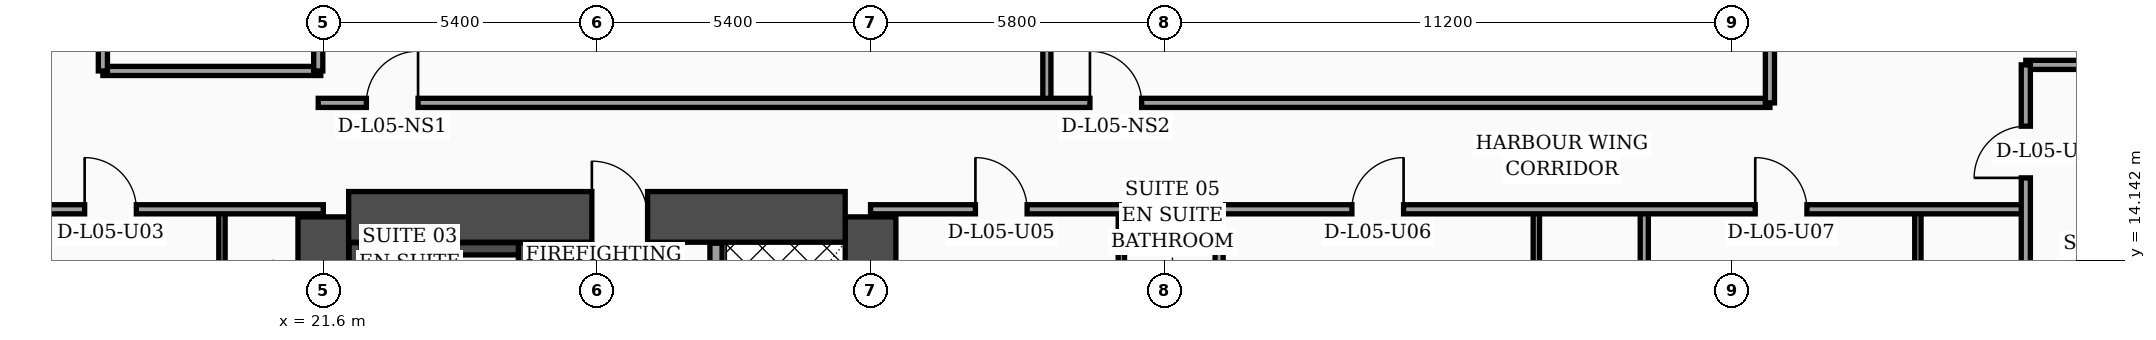
"""IFC4 building model, lengths in metres.
Left out: names, types, materials, properties, quantities, classifications, styles, units other than length and angle.
Written with IfcOpenShell. Run it as: python <this file> out.ifc"""

import sys

from ifc_helpers import new_model, si_unit, direction, frame, frame_2d, origin, place, context, subcontext, project, spatial, rectangle, extrude, element, fill, save


model = new_model("IFC4")
c1 = context("Model", 3, precision=1e-05, world=origin(), true_north=direction((0.0, 1.0)))
c2 = subcontext(c1, "Body", "Model", "MODEL_VIEW")
j1 = project(units=[si_unit("LENGTHUNIT", "METRE"), si_unit("PLANEANGLEUNIT", "RADIAN")], contexts=[c1])
p1 = place(None, origin())
s1 = spatial("IfcSite", under=j1, at=p1, CompositionType="ELEMENT")
p2 = place(p1, origin())
s2 = spatial("IfcBuilding", under=s1, at=p2, CompositionType="ELEMENT")
p3 = place(p2, frame((0.0, 0.0, 27.0)))
s3 = spatial("IfcBuildingStorey", under=s2, at=p3, CompositionType="ELEMENT", Elevation=27.0)
for number, where, z_axis, x_axis in (
    (1, (21.6, 4.6, 0.0), (0.0, 0.0, 1.0), (0.0, 1.0, 0.0)),
    (2, (32.4, 4.6, 0.0), (0.0, 0.0, 1.0), (0.0, 1.0, 0.0)),
):
    element("IfcWall", number, at=place(p3, frame(where, z_axis=z_axis, x_axis=x_axis)), inside=s3, PredefinedType="SHEAR", context=c2, shape_type="SweptSolid", body=[
        extrude(rectangle(XDim=10.4, YDim=1.0, at=frame_2d((5.2, 0.0))), origin(), (0.0, 0.0, 1.0), 3.56),
    ])
p4 = place(p3, frame((22.1, 15.0, 0.0), z_axis=(0.0, 0.0, 1.0), x_axis=(1.0, 0.0, 0.0)))
e3 = element("IfcWall", 3, at=p4, inside=s3, PredefinedType="SHEAR", context=c2, shape_type="SweptSolid", body=[
    extrude(rectangle(XDim=9.8, YDim=1.0, at=frame_2d((4.9, 0.0))), origin(), (0.0, 0.0, 1.0), 3.56),
])
p5 = place(p4, frame((4.8, 0.0, 0.0)))
e4 = element("IfcOpeningElement", 4, at=p5, cuts=e3, PredefinedType="OPENING", context=c2, shape_type="SweptSolid", body=[
    extrude(rectangle(XDim=1.1, YDim=2.2, at=frame_2d((0.55, 1.1))), frame((0.0, 0.51, 0.0), z_axis=(0.0, -1.0, 0.0), x_axis=(1.0, 0.0, 0.0)), (0.0, 0.0, 1.0), 1.02),
])
p6 = place(p3, frame((22.23, 5.1, 0.0), z_axis=(0.0, 0.0, 1.0), x_axis=(0.0, 1.0, 0.0)))
e5 = element("IfcWall", 5, at=p6, inside=s3, PredefinedType="SOLIDWALL", context=c2, shape_type="SweptSolid", body=[
    extrude(rectangle(XDim=9.39, YDim=0.24, at=frame_2d((4.695, 0.0))), origin(), (0.0, 0.0, 1.0), 3.56),
])
p7 = place(p3, frame((25.57, 5.1, 0.0), z_axis=(0.0, 0.0, 1.0), x_axis=(0.0, 1.0, 0.0)))
e6 = element("IfcWall", 6, at=p7, inside=s3, PredefinedType="SOLIDWALL", context=c2, shape_type="SweptSolid", body=[
    extrude(rectangle(XDim=9.39, YDim=0.24, at=frame_2d((4.695, 0.0))), origin(), (0.0, 0.0, 1.0), 3.56),
])
p8 = place(p7, frame((0.35, 0.0, 0.0)))
e7 = element("IfcOpeningElement", 7, at=p8, cuts=e6, PredefinedType="OPENING", context=c2, shape_type="SweptSolid", body=[
    extrude(rectangle(XDim=1.15, YDim=2.2, at=frame_2d((0.575, 1.1))), frame((0.0, 0.13, 0.0), z_axis=(0.0, -1.0, 0.0), x_axis=(1.0, 0.0, 0.0)), (0.0, 0.0, 1.0), 0.26),
])
p9 = place(p3, frame((22.35, 14.37, 0.0), z_axis=(0.0, 0.0, 1.0), x_axis=(1.0, 0.0, 0.0)))
e8 = element("IfcWall", 8, at=p9, inside=s3, PredefinedType="SOLIDWALL", context=c2, shape_type="SweptSolid", body=[
    extrude(rectangle(XDim=3.1, YDim=0.24, at=frame_2d((1.55, 0.0))), origin(), (0.0, 0.0, 1.0), 3.56),
])
p10 = place(p3, frame((63.63, 5.505, 0.0), z_axis=(0.0, 0.0, 1.0), x_axis=(-0.300501856448, 0.953781229775, 0.0)))
e9 = element("IfcWall", 9, at=p10, inside=s3, PredefinedType="SOLIDWALL", context=c2, shape_type="SweptSolid", body=[
    extrude(rectangle(XDim=30.814, YDim=0.32, at=frame_2d((15.407, 0.0))), origin(), (0.0, 0.0, 1.0), 3.56),
])
p11 = place(p10, frame((4.6, 0.0, 0.0)))
e10 = element("IfcOpeningElement", 10, at=p11, cuts=e9, PredefinedType="OPENING", context=c2, shape_type="SweptSolid", body=[
    extrude(rectangle(XDim=1.4, YDim=2.25, at=frame_2d((0.7, 1.125))), frame((0.0, 0.17, 0.0), z_axis=(0.0, -1.0, 0.0), x_axis=(1.0, 0.0, 0.0)), (0.0, 0.0, 1.0), 0.34),
])
p12 = place(p10, frame((7.8, 0.0, 0.75)))
e11 = element("IfcOpeningElement", 11, at=p12, cuts=e9, PredefinedType="OPENING", context=c2, shape_type="SweptSolid", body=[
    extrude(rectangle(XDim=1.5, YDim=1.6, at=frame_2d((0.75, 0.8))), frame((0.0, 0.17, 0.0), z_axis=(0.0, -1.0, 0.0), x_axis=(1.0, 0.0, 0.0)), (0.0, 0.0, 1.0), 0.34),
])
p13 = place(p10, frame((10.9, 0.0, 0.75)))
e12 = element("IfcOpeningElement", 12, at=p13, cuts=e9, PredefinedType="OPENING", context=c2, shape_type="SweptSolid", body=[
    extrude(rectangle(XDim=1.5, YDim=1.6, at=frame_2d((0.75, 0.8))), frame((0.0, 0.17, 0.0), z_axis=(0.0, -1.0, 0.0), x_axis=(1.0, 0.0, 0.0)), (0.0, 0.0, 1.0), 0.34),
])
p14 = place(p10, frame((14.0, 0.0, 0.75)))
e13 = element("IfcOpeningElement", 13, at=p14, cuts=e9, PredefinedType="OPENING", context=c2, shape_type="SweptSolid", body=[
    extrude(rectangle(XDim=1.5, YDim=1.6, at=frame_2d((0.75, 0.8))), frame((0.0, 0.17, 0.0), z_axis=(0.0, -1.0, 0.0), x_axis=(1.0, 0.0, 0.0)), (0.0, 0.0, 1.0), 0.34),
])
p15 = place(p10, frame((17.1, 0.0, 0.75)))
e14 = element("IfcOpeningElement", 14, at=p15, cuts=e9, PredefinedType="OPENING", context=c2, shape_type="SweptSolid", body=[
    extrude(rectangle(XDim=1.5, YDim=1.6, at=frame_2d((0.75, 0.8))), frame((0.0, 0.17, 0.0), z_axis=(0.0, -1.0, 0.0), x_axis=(1.0, 0.0, 0.0)), (0.0, 0.0, 1.0), 0.34),
])
p16 = place(p10, frame((20.2, 0.0, 0.75)))
e15 = element("IfcOpeningElement", 15, at=p16, cuts=e9, PredefinedType="OPENING", context=c2, shape_type="SweptSolid", body=[
    extrude(rectangle(XDim=1.5, YDim=1.6, at=frame_2d((0.75, 0.8))), frame((0.0, 0.17, 0.0), z_axis=(0.0, -1.0, 0.0), x_axis=(1.0, 0.0, 0.0)), (0.0, 0.0, 1.0), 0.34),
])
p17 = place(p10, frame((23.3, 0.0, 0.75)))
e16 = element("IfcOpeningElement", 16, at=p17, cuts=e9, PredefinedType="OPENING", context=c2, shape_type="SweptSolid", body=[
    extrude(rectangle(XDim=1.5, YDim=1.6, at=frame_2d((0.75, 0.8))), frame((0.0, 0.17, 0.0), z_axis=(0.0, -1.0, 0.0), x_axis=(1.0, 0.0, 0.0)), (0.0, 0.0, 1.0), 0.34),
])
p18 = place(p10, frame((26.4, 0.0, 0.75)))
e17 = element("IfcOpeningElement", 17, at=p18, cuts=e9, PredefinedType="OPENING", context=c2, shape_type="SweptSolid", body=[
    extrude(rectangle(XDim=1.5, YDim=1.6, at=frame_2d((0.75, 0.8))), frame((0.0, 0.17, 0.0), z_axis=(0.0, -1.0, 0.0), x_axis=(1.0, 0.0, 0.0)), (0.0, 0.0, 1.0), 0.34),
])
p19 = place(p3, frame((29.35, 5.12, 0.0), z_axis=(0.0, 0.0, 1.0), x_axis=(0.0, 1.0, 0.0)))
e18 = element("IfcWall", 18, at=p19, inside=s3, PredefinedType="SOLIDWALL", context=c2, shape_type="SweptSolid", body=[
    extrude(rectangle(XDim=9.36, YDim=0.24, at=frame_2d((4.68, 0.0))), origin(), (0.0, 0.0, 1.0), 3.56),
])
p20 = place(p19, frame((0.55, 0.0, 0.0)))
e19 = element("IfcOpeningElement", 19, at=p20, cuts=e18, PredefinedType="OPENING", context=c2, shape_type="SweptSolid", body=[
    extrude(rectangle(XDim=1.3, YDim=2.35, at=frame_2d((0.65, 1.175))), frame((0.0, 0.13, 0.0), z_axis=(0.0, -1.0, 0.0), x_axis=(1.0, 0.0, 0.0)), (0.0, 0.0, 1.0), 0.26),
])
p21 = place(p3, frame((19.6, 2.44, 0.0), z_axis=(0.0, 0.0, 1.0), x_axis=(0.0, 1.0, 0.0)))
e20 = element("IfcWall", 20, at=p21, inside=s3, PredefinedType="PARTITIONING", context=c2, shape_type="SweptSolid", body=[
    extrude(rectangle(XDim=12.71, YDim=0.125, at=frame_2d((6.355, 0.0))), origin(), (0.0, 0.0, 1.0), 2.34),
])
p22 = place(p21, frame((4.34, 0.0, 0.0)))
e21 = element("IfcOpeningElement", 21, at=p22, cuts=e20, PredefinedType="OPENING", context=c2, shape_type="SweptSolid", body=[
    extrude(rectangle(XDim=0.96, YDim=2.2, at=frame_2d((0.48, 1.1))), frame((0.0, 0.073, 0.0), z_axis=(0.0, -1.0, 0.0), x_axis=(1.0, 0.0, 0.0)), (0.0, 0.0, 1.0), 0.145),
])
p23 = place(p21, frame((10.18, 0.0, 0.0)))
e22 = element("IfcOpeningElement", 22, at=p23, cuts=e20, PredefinedType="OPENING", context=c2, shape_type="SweptSolid", body=[
    extrude(rectangle(XDim=0.9, YDim=2.15, at=frame_2d((0.45, 1.075))), frame((0.0, 0.073, 0.0), z_axis=(0.0, -1.0, 0.0), x_axis=(1.0, 0.0, 0.0)), (0.0, 0.0, 1.0), 0.145),
])
p24 = place(p3, frame((15.15, 15.15, 0.0), z_axis=(0.0, 0.0, 1.0), x_axis=(1.0, 0.0, 0.0)))
e23 = element("IfcWall", 23, at=p24, inside=s3, PredefinedType="PARTITIONING", context=c2, shape_type="SweptSolid", body=[
    extrude(rectangle(XDim=6.45, YDim=0.18, at=frame_2d((3.225, 0.0))), origin(), (0.0, 0.0, 1.0), 2.34),
])
p25 = place(p24, frame((1.74, 0.0, 0.0)))
e24 = element("IfcOpeningElement", 24, at=p25, cuts=e23, PredefinedType="OPENING", context=c2, shape_type="SweptSolid", body=[
    extrude(rectangle(XDim=1.02, YDim=2.2, at=frame_2d((0.51, 1.1))), frame((0.0, 0.1, 0.0), z_axis=(0.0, -1.0, 0.0), x_axis=(1.0, 0.0, 0.0)), (0.0, 0.0, 1.0), 0.2),
])
p26 = place(p3, frame((17.25, 17.88, 0.0), z_axis=(0.0, 0.0, 1.0), x_axis=(1.0, 0.0, 0.0)))
e25 = element("IfcWall", 25, at=p26, inside=s3, PredefinedType="PARTITIONING", context=c2, shape_type="SweptSolid", body=[
    extrude(rectangle(XDim=4.3, YDim=0.18, at=frame_2d((2.15, 0.0))), origin(), (0.0, 0.0, 1.0), 3.56),
])
p27 = place(p3, frame((21.5, 17.88, 0.0), z_axis=(0.0, 0.0, 1.0), x_axis=(0.0, 1.0, 0.0)))
e26 = element("IfcWall", 26, at=p27, inside=s3, PredefinedType="PARTITIONING", context=c2, shape_type="SweptSolid", body=[
    extrude(rectangle(XDim=6.44, YDim=0.18, at=frame_2d((3.22, 0.0))), origin(), (0.0, 0.0, 1.0), 3.56),
])
p28 = place(p3, frame((17.25, 17.88, 0.0), z_axis=(0.0, 0.0, 1.0), x_axis=(0.0, 1.0, 0.0)))
e27 = element("IfcWall", 27, at=p28, inside=s3, PredefinedType="PARTITIONING", context=c2, shape_type="SweptSolid", body=[
    extrude(rectangle(XDim=6.44, YDim=0.18, at=frame_2d((3.22, 0.0))), origin(), (0.0, 0.0, 1.0), 3.56),
])
p29 = place(p28, frame((0.65, 0.0, 0.0)))
e28 = element("IfcOpeningElement", 28, at=p29, cuts=e27, PredefinedType="OPENING", context=c2, shape_type="SweptSolid", body=[
    extrude(rectangle(XDim=0.98, YDim=2.15, at=frame_2d((0.49, 1.075))), frame((0.0, 0.1, 0.0), z_axis=(0.0, -1.0, 0.0), x_axis=(1.0, 0.0, 0.0)), (0.0, 0.0, 1.0), 0.2),
])
p30 = place(p28, frame((3.27, 0.0, 0.0)))
e29 = element("IfcOpeningElement", 29, at=p30, cuts=e27, PredefinedType="OPENING", context=c2, shape_type="SweptSolid", body=[
    extrude(rectangle(XDim=0.96, YDim=2.2, at=frame_2d((0.48, 1.1))), frame((0.0, 0.1, 0.0), z_axis=(0.0, -1.0, 0.0), x_axis=(1.0, 0.0, 0.0)), (0.0, 0.0, 1.0), 0.2),
])
p31 = place(p3, frame((37.35, 2.44, 0.0), z_axis=(0.0, 0.0, 1.0), x_axis=(0.0, 1.0, 0.0)))
e30 = element("IfcWall", 30, at=p31, inside=s3, PredefinedType="PARTITIONING", context=c2, shape_type="SweptSolid", body=[
    extrude(rectangle(XDim=12.71, YDim=0.125, at=frame_2d((6.355, 0.0))), origin(), (0.0, 0.0, 1.0), 2.84),
])
p32 = place(p31, frame((4.35, 0.0, 0.0)))
e31 = element("IfcOpeningElement", 31, at=p32, cuts=e30, PredefinedType="OPENING", context=c2, shape_type="SweptSolid", body=[
    extrude(rectangle(XDim=0.96, YDim=2.2, at=frame_2d((0.48, 1.1))), frame((0.0, 0.073, 0.0), z_axis=(0.0, -1.0, 0.0), x_axis=(1.0, 0.0, 0.0)), (0.0, 0.0, 1.0), 0.145),
])
p33 = place(p31, frame((10.21, 0.0, 0.0)))
e32 = element("IfcOpeningElement", 32, at=p33, cuts=e30, PredefinedType="OPENING", context=c2, shape_type="SweptSolid", body=[
    extrude(rectangle(XDim=0.9, YDim=2.15, at=frame_2d((0.45, 1.075))), frame((0.0, 0.073, 0.0), z_axis=(0.0, -1.0, 0.0), x_axis=(1.0, 0.0, 0.0)), (0.0, 0.0, 1.0), 0.145),
])
p34 = place(p3, frame((45.54, 2.44, 0.0), z_axis=(0.0, 0.0, 1.0), x_axis=(0.0, 1.0, 0.0)))
e33 = element("IfcWall", 33, at=p34, inside=s3, PredefinedType="PARTITIONING", context=c2, shape_type="SweptSolid", body=[
    extrude(rectangle(XDim=12.71, YDim=0.125, at=frame_2d((6.355, 0.0))), origin(), (0.0, 0.0, 1.0), 3.04),
])
p35 = place(p34, frame((4.35, 0.0, 0.0)))
e34 = element("IfcOpeningElement", 34, at=p35, cuts=e33, PredefinedType="OPENING", context=c2, shape_type="SweptSolid", body=[
    extrude(rectangle(XDim=0.96, YDim=2.2, at=frame_2d((0.48, 1.1))), frame((0.0, 0.073, 0.0), z_axis=(0.0, -1.0, 0.0), x_axis=(1.0, 0.0, 0.0)), (0.0, 0.0, 1.0), 0.145),
])
p36 = place(p34, frame((10.21, 0.0, 0.0)))
e35 = element("IfcOpeningElement", 35, at=p36, cuts=e33, PredefinedType="OPENING", context=c2, shape_type="SweptSolid", body=[
    extrude(rectangle(XDim=0.9, YDim=2.15, at=frame_2d((0.45, 1.075))), frame((0.0, 0.073, 0.0), z_axis=(0.0, -1.0, 0.0), x_axis=(1.0, 0.0, 0.0)), (0.0, 0.0, 1.0), 0.145),
])
p37 = place(p3, frame((39.28, 2.44, 0.0), z_axis=(0.0, 0.0, 1.0), x_axis=(0.0, 1.0, 0.0)))
e36 = element("IfcWall", 36, at=p37, inside=s3, PredefinedType="PARTITIONING", context=c2, shape_type="SweptSolid", body=[
    extrude(rectangle(XDim=12.71, YDim=0.16, at=frame_2d((6.355, 0.0))), origin(), (0.0, 0.0, 1.0), 2.84),
])
p38 = place(p3, frame((53.07, 2.44, 0.0), z_axis=(0.0, 0.0, 1.0), x_axis=(0.0, 1.0, 0.0)))
e37 = element("IfcWall", 37, at=p38, inside=s3, PredefinedType="PARTITIONING", context=c2, shape_type="SweptSolid", body=[
    extrude(rectangle(XDim=12.71, YDim=0.125, at=frame_2d((6.355, 0.0))), origin(), (0.0, 0.0, 1.0), 3.04),
])
p39 = place(p38, frame((4.35, 0.0, 0.0)))
e38 = element("IfcOpeningElement", 38, at=p39, cuts=e37, PredefinedType="OPENING", context=c2, shape_type="SweptSolid", body=[
    extrude(rectangle(XDim=0.96, YDim=2.2, at=frame_2d((0.48, 1.1))), frame((0.0, 0.073, 0.0), z_axis=(0.0, -1.0, 0.0), x_axis=(1.0, 0.0, 0.0)), (0.0, 0.0, 1.0), 0.145),
])
p40 = place(p38, frame((10.21, 0.0, 0.0)))
e39 = element("IfcOpeningElement", 39, at=p40, cuts=e37, PredefinedType="OPENING", context=c2, shape_type="SweptSolid", body=[
    extrude(rectangle(XDim=0.9, YDim=2.15, at=frame_2d((0.45, 1.075))), frame((0.0, 0.073, 0.0), z_axis=(0.0, -1.0, 0.0), x_axis=(1.0, 0.0, 0.0)), (0.0, 0.0, 1.0), 0.145),
])
p41 = place(p3, frame((47.67, 2.44, 0.0), z_axis=(0.0, 0.0, 1.0), x_axis=(0.0, 1.0, 0.0)))
e40 = element("IfcWall", 40, at=p41, inside=s3, PredefinedType="PARTITIONING", context=c2, shape_type="SweptSolid", body=[
    extrude(rectangle(XDim=12.71, YDim=0.16, at=frame_2d((6.355, 0.0))), origin(), (0.0, 0.0, 1.0), 2.84),
])
p42 = place(p3, frame((32.4, 15.15, 0.0), z_axis=(0.0, 0.0, 1.0), x_axis=(1.0, 0.0, 0.0)))
e41 = element("IfcWall", 41, at=p42, inside=s3, PredefinedType="PARTITIONING", context=c2, shape_type="SweptSolid", body=[
    extrude(rectangle(XDim=22.8, YDim=0.18, at=frame_2d((11.4, 0.0))), origin(), (0.0, 0.0, 1.0), 2.84),
])
p43 = place(p42, frame((2.07, 0.0, 0.0)))
e42 = element("IfcOpeningElement", 42, at=p43, cuts=e41, PredefinedType="OPENING", context=c2, shape_type="SweptSolid", body=[
    extrude(rectangle(XDim=1.02, YDim=2.2, at=frame_2d((0.51, 1.1))), frame((0.0, 0.1, 0.0), z_axis=(0.0, -1.0, 0.0), x_axis=(1.0, 0.0, 0.0)), (0.0, 0.0, 1.0), 0.2),
])
p44 = place(p42, frame((9.5, 0.0, 0.0)))
e43 = element("IfcOpeningElement", 43, at=p44, cuts=e41, PredefinedType="OPENING", context=c2, shape_type="SweptSolid", body=[
    extrude(rectangle(XDim=1.02, YDim=2.2, at=frame_2d((0.51, 1.1))), frame((0.0, 0.1, 0.0), z_axis=(0.0, -1.0, 0.0), x_axis=(1.0, 0.0, 0.0)), (0.0, 0.0, 1.0), 0.2),
])
p45 = place(p42, frame((17.46, 0.0, 0.0)))
e44 = element("IfcOpeningElement", 44, at=p45, cuts=e41, PredefinedType="OPENING", context=c2, shape_type="SweptSolid", body=[
    extrude(rectangle(XDim=1.02, YDim=2.2, at=frame_2d((0.51, 1.1))), frame((0.0, 0.1, 0.0), z_axis=(0.0, -1.0, 0.0), x_axis=(1.0, 0.0, 0.0)), (0.0, 0.0, 1.0), 0.2),
])
p46 = place(p3, frame((35.88, 17.25, 0.0), z_axis=(0.0, 0.0, 1.0), x_axis=(0.0, 1.0, 0.0)))
e45 = element("IfcWall", 45, at=p46, inside=s3, PredefinedType="PARTITIONING", context=c2, shape_type="SweptSolid", body=[
    extrude(rectangle(XDim=13.97, YDim=0.16, at=frame_2d((6.985, 0.0))), origin(), (0.0, 0.0, 1.0), 2.84),
])
p47 = place(p3, frame((21.5, 17.25, 0.0), z_axis=(0.0, 0.0, 1.0), x_axis=(1.0, 0.0, 0.0)))
e46 = element("IfcWall", 46, at=p47, inside=s3, PredefinedType="PARTITIONING", context=c2, shape_type="SweptSolid", body=[
    extrude(rectangle(XDim=28.65, YDim=0.18, at=frame_2d((14.325, 0.0))), origin(), (0.0, 0.0, 1.0), 2.84),
])
p48 = place(p47, frame((0.95, 0.0, 0.0)))
e47 = element("IfcOpeningElement", 47, at=p48, cuts=e46, PredefinedType="OPENING", context=c2, shape_type="SweptSolid", body=[
    extrude(rectangle(XDim=1.02, YDim=2.2, at=frame_2d((0.51, 1.1))), frame((0.0, 0.1, 0.0), z_axis=(0.0, -1.0, 0.0), x_axis=(1.0, 0.0, 0.0)), (0.0, 0.0, 1.0), 0.2),
])
p49 = place(p47, frame((15.23, 0.0, 0.0)))
e48 = element("IfcOpeningElement", 48, at=p49, cuts=e46, PredefinedType="OPENING", context=c2, shape_type="SweptSolid", body=[
    extrude(rectangle(XDim=1.02, YDim=2.2, at=frame_2d((0.51, 1.1))), frame((0.0, 0.1, 0.0), z_axis=(0.0, -1.0, 0.0), x_axis=(1.0, 0.0, 0.0)), (0.0, 0.0, 1.0), 0.2),
])
p50 = place(p3, frame((50.15, 17.25, 0.0), z_axis=(0.0, 0.0, 1.0), x_axis=(0.0, 1.0, 0.0)))
e49 = element("IfcWall", 49, at=p50, inside=s3, PredefinedType="PARTITIONING", context=c2, shape_type="SweptSolid", body=[
    extrude(rectangle(XDim=20.71, YDim=0.18, at=frame_2d((10.355, 0.0))), origin(), (0.0, 0.0, 1.0), 2.84),
])
p51 = place(p3, frame((55.2, 18.0, 0.0), z_axis=(0.0, 0.0, 1.0), x_axis=(1.0, 0.0, 0.0)))
e50 = element("IfcWall", 50, at=p51, inside=s3, PredefinedType="PARTITIONING", context=c2, shape_type="SweptSolid", body=[
    extrude(rectangle(XDim=4.43, YDim=0.18, at=frame_2d((2.215, 0.0))), origin(), (0.0, 0.0, 1.0), 3.04),
])
p52 = place(p3, frame((55.2, 2.44, 0.0), z_axis=(0.0, 0.0, 1.0), x_axis=(0.0, 1.0, 0.0)))
e51 = element("IfcWall", 51, at=p52, inside=s3, PredefinedType="PARTITIONING", context=c2, shape_type="SweptSolid", body=[
    extrude(rectangle(XDim=15.56, YDim=0.18, at=frame_2d((7.78, 0.0))), origin(), (0.0, 0.0, 1.0), 3.04),
])
p53 = place(p52, frame((13.33, 0.0, 0.0)))
e52 = element("IfcOpeningElement", 52, at=p53, cuts=e51, PredefinedType="OPENING", context=c2, shape_type="SweptSolid", body=[
    extrude(rectangle(XDim=1.02, YDim=2.2, at=frame_2d((0.51, 1.1))), frame((0.0, 0.1, 0.0), z_axis=(0.0, -1.0, 0.0), x_axis=(1.0, 0.0, 0.0)), (0.0, 0.0, 1.0), 0.2),
])
p54 = place(p25, origin())
e53 = element("IfcDoor", 53, at=p54, inside=s3, OperationType="SINGLE_SWING_LEFT", PredefinedType="DOOR", context=c2, shape_type="SweptSolid", body=[
    extrude(rectangle(XDim=1.02, YDim=2.2, at=frame_2d((0.51, 1.1))), frame((0.0, 0.025, 0.0), z_axis=(0.0, -1.0, 0.0), x_axis=(1.0, 0.0, 0.0)), (0.0, 0.0, 1.0), 0.05),
])
fill(e24, e53)
p55 = place(p43, origin())
e54 = element("IfcDoor", 54, at=p55, inside=s3, OperationType="SINGLE_SWING_LEFT", PredefinedType="DOOR", context=c2, shape_type="SweptSolid", body=[
    extrude(rectangle(XDim=1.02, YDim=2.2, at=frame_2d((0.51, 1.1))), frame((0.0, 0.025, 0.0), z_axis=(0.0, -1.0, 0.0), x_axis=(1.0, 0.0, 0.0)), (0.0, 0.0, 1.0), 0.05),
])
fill(e42, e54)
p56 = place(p44, origin())
e55 = element("IfcDoor", 55, at=p56, inside=s3, OperationType="SINGLE_SWING_RIGHT", PredefinedType="DOOR", context=c2, shape_type="SweptSolid", body=[
    extrude(rectangle(XDim=1.02, YDim=2.2, at=frame_2d((0.51, 1.1))), frame((0.0, 0.025, 0.0), z_axis=(0.0, -1.0, 0.0), x_axis=(1.0, 0.0, 0.0)), (0.0, 0.0, 1.0), 0.05),
])
fill(e43, e55)
p57 = place(p45, origin())
e56 = element("IfcDoor", 56, at=p57, inside=s3, OperationType="SINGLE_SWING_LEFT", PredefinedType="DOOR", context=c2, shape_type="SweptSolid", body=[
    extrude(rectangle(XDim=1.02, YDim=2.2, at=frame_2d((0.51, 1.1))), frame((0.0, 0.025, 0.0), z_axis=(0.0, -1.0, 0.0), x_axis=(1.0, 0.0, 0.0)), (0.0, 0.0, 1.0), 0.05),
])
fill(e44, e56)
p58 = place(p48, origin())
e57 = element("IfcDoor", 57, at=p58, inside=s3, OperationType="SINGLE_SWING_RIGHT", PredefinedType="DOOR", context=c2, shape_type="SweptSolid", body=[
    extrude(rectangle(XDim=1.02, YDim=2.2, at=frame_2d((0.51, 1.1))), frame((0.0, 0.025, 0.0), z_axis=(0.0, -1.0, 0.0), x_axis=(1.0, 0.0, 0.0)), (0.0, 0.0, 1.0), 0.05),
])
fill(e47, e57)
p59 = place(p49, origin())
e58 = element("IfcDoor", 58, at=p59, inside=s3, OperationType="SINGLE_SWING_LEFT", PredefinedType="DOOR", context=c2, shape_type="SweptSolid", body=[
    extrude(rectangle(XDim=1.02, YDim=2.2, at=frame_2d((0.51, 1.1))), frame((0.0, 0.025, 0.0), z_axis=(0.0, -1.0, 0.0), x_axis=(1.0, 0.0, 0.0)), (0.0, 0.0, 1.0), 0.05),
])
fill(e48, e58)
p60 = place(p53, origin())
e59 = element("IfcDoor", 59, at=p60, inside=s3, OperationType="SINGLE_SWING_LEFT", PredefinedType="DOOR", context=c2, shape_type="SweptSolid", body=[
    extrude(rectangle(XDim=1.02, YDim=2.2, at=frame_2d((0.51, 1.1))), frame((0.0, 0.025, 0.0), z_axis=(0.0, -1.0, 0.0), x_axis=(1.0, 0.0, 0.0)), (0.0, 0.0, 1.0), 0.05),
])
fill(e52, e59)
p61 = place(p5, origin())
e60 = element("IfcDoor", 60, at=p61, inside=s3, OperationType="SINGLE_SWING_LEFT", PredefinedType="DOOR", context=c2, shape_type="SweptSolid", body=[
    extrude(rectangle(XDim=1.1, YDim=2.2, at=frame_2d((0.55, 1.1))), frame((0.0, 0.025, 0.0), z_axis=(0.0, -1.0, 0.0), x_axis=(1.0, 0.0, 0.0)), (0.0, 0.0, 1.0), 0.05),
])
fill(e4, e60)
save(model, sys.argv[1])
